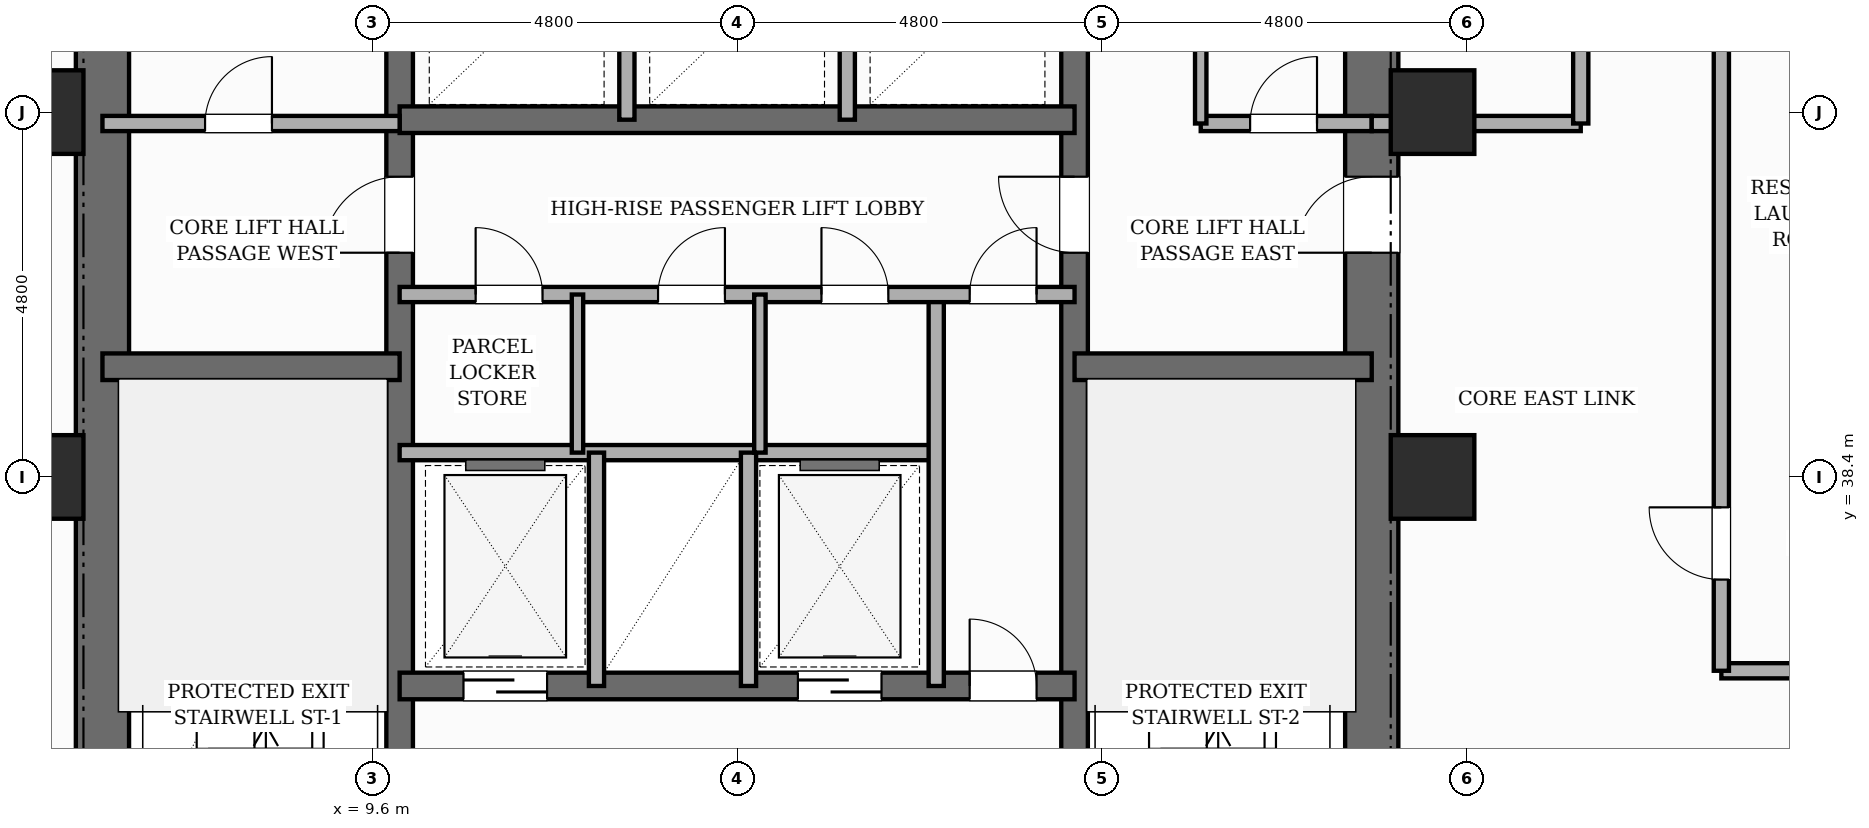
"""IFC4 building model, lengths in metres.
Left out: names, types, materials, properties, quantities, classifications, styles, units other than length and angle.
Written with IfcOpenShell. Run it as: python <this file> out.ifc"""

import sys

from ifc_helpers import new_model, si_unit, direction, frame, frame_2d, origin, origin_2d, place, context, subcontext, project, spatial, rectangle, extrude, element, fill, save


model = new_model("IFC4")
c1 = context("Model", 3, precision=1e-05, world=origin(), true_north=direction((0.0, 1.0)))
c2 = subcontext(c1, "Body", "Model", "MODEL_VIEW")
j1 = project(units=[si_unit("LENGTHUNIT", "METRE"), si_unit("PLANEANGLEUNIT", "RADIAN")], contexts=[c1])
p1 = place(None, origin())
s1 = spatial("IfcSite", under=j1, at=p1, CompositionType="ELEMENT")
p2 = place(p1, origin())
s2 = spatial("IfcBuilding", under=s1, at=p2, CompositionType="ELEMENT")
p3 = place(p2, frame((0.0, 0.0, 79.0)))
s3 = spatial("IfcBuildingStorey", under=s2, at=p3, CompositionType="ELEMENT", Elevation=79.0)
p4 = place(p3, frame((6.05, 30.55, 0.0), z_axis=(0.0, 0.0, 1.0), x_axis=(0.0, 1.0, 0.0)))
e1 = element("IfcWall", 1, at=p4, inside=s3, PredefinedType="SHEAR", context=c2, shape_type="SweptSolid", body=[
    extrude(rectangle(XDim=15.6, YDim=0.7, at=frame_2d((7.8, 0.0))), origin(), (0.0, 0.0, 1.0), 3.6),
])
p5 = place(p3, frame((22.75, 30.55, 0.0), z_axis=(0.0, 0.0, 1.0), x_axis=(0.0, 1.0, 0.0)))
e2 = element("IfcWall", 2, at=p5, inside=s3, PredefinedType="SHEAR", context=c2, shape_type="SweptSolid", body=[
    extrude(rectangle(XDim=15.6, YDim=0.7, at=frame_2d((7.8, 0.0))), origin(), (0.0, 0.0, 1.0), 3.6),
])
p6 = place(p5, frame((10.8, 0.0, 0.0)))
e3 = element("IfcOpeningElement", 3, at=p6, cuts=e2, PredefinedType="OPENING", context=c2, shape_type="SweptSolid", body=[
    extrude(rectangle(XDim=1.0, YDim=2.15, at=frame_2d((0.5, 1.075))), frame((0.0, 0.36, 0.0), z_axis=(0.0, -1.0, 0.0), x_axis=(1.0, 0.0, 0.0)), (0.0, 0.0, 1.0), 0.72),
])
p7 = place(p3, frame((9.96, 30.9, 0.0), z_axis=(0.0, 0.0, 1.0), x_axis=(0.0, 1.0, 0.0)))
e4 = element("IfcWall", 4, at=p7, inside=s3, PredefinedType="SHEAR", context=c2, shape_type="SweptSolid", body=[
    extrude(rectangle(XDim=14.9, YDim=0.35, at=frame_2d((7.45, 0.0))), origin(), (0.0, 0.0, 1.0), 3.6),
])
p8 = place(p7, frame((0.65, 0.0, 0.0)))
e5 = element("IfcOpeningElement", 5, at=p8, cuts=e4, PredefinedType="OPENING", context=c2, shape_type="SweptSolid", body=[
    extrude(rectangle(XDim=0.95, YDim=2.1, at=frame_2d((0.475, 1.05))), frame((0.0, 0.185, 0.0), z_axis=(0.0, -1.0, 0.0), x_axis=(1.0, 0.0, 0.0)), (0.0, 0.0, 1.0), 0.37),
])
p9 = place(p7, frame((10.45, 0.0, 0.0)))
e6 = element("IfcOpeningElement", 6, at=p9, cuts=e4, PredefinedType="OPENING", context=c2, shape_type="SweptSolid", body=[
    extrude(rectangle(XDim=1.0, YDim=2.15, at=frame_2d((0.5, 1.075))), frame((0.0, 0.185, 0.0), z_axis=(0.0, -1.0, 0.0), x_axis=(1.0, 0.0, 0.0)), (0.0, 0.0, 1.0), 0.37),
])
p10 = place(p3, frame((18.84, 30.9, 0.0), z_axis=(0.0, 0.0, 1.0), x_axis=(0.0, 1.0, 0.0)))
e7 = element("IfcWall", 7, at=p10, inside=s3, PredefinedType="SHEAR", context=c2, shape_type="SweptSolid", body=[
    extrude(rectangle(XDim=14.9, YDim=0.35, at=frame_2d((7.45, 0.0))), origin(), (0.0, 0.0, 1.0), 3.6),
])
p11 = place(p10, frame((0.65, 0.0, 0.0)))
e8 = element("IfcOpeningElement", 8, at=p11, cuts=e7, PredefinedType="OPENING", context=c2, shape_type="SweptSolid", body=[
    extrude(rectangle(XDim=0.95, YDim=2.1, at=frame_2d((0.475, 1.05))), frame((0.0, 0.185, 0.0), z_axis=(0.0, -1.0, 0.0), x_axis=(1.0, 0.0, 0.0)), (0.0, 0.0, 1.0), 0.37),
])
p12 = place(p10, frame((10.45, 0.0, 0.0)))
e9 = element("IfcOpeningElement", 9, at=p12, cuts=e7, PredefinedType="OPENING", context=c2, shape_type="SweptSolid", body=[
    extrude(rectangle(XDim=1.0, YDim=2.15, at=frame_2d((0.5, 1.075))), frame((0.0, 0.185, 0.0), z_axis=(0.0, -1.0, 0.0), x_axis=(1.0, 0.0, 0.0)), (0.0, 0.0, 1.0), 0.37),
])
for number, where, z_axis, x_axis in (
    (10, (6.05, 39.85, 0.0), (0.0, 0.0, 1.0), (1.0, 0.0, 0.0)),
    (11, (18.84, 39.85, 0.0), (0.0, 0.0, 1.0), (1.0, 0.0, 0.0)),
):
    element("IfcWall", number, at=place(p3, frame(where, z_axis=z_axis, x_axis=x_axis)), inside=s3, PredefinedType="SHEAR", context=c2, shape_type="SweptSolid", body=[
        extrude(rectangle(XDim=3.91, YDim=0.35, at=frame_2d((1.955, 0.0))), origin(), (0.0, 0.0, 1.0), 3.6),
    ])
p13 = place(p3, frame((9.96, 35.65, 0.0), z_axis=(0.0, 0.0, 1.0), x_axis=(1.0, 0.0, 0.0)))
e12 = element("IfcWall", 12, at=p13, inside=s3, PredefinedType="SHEAR", context=c2, shape_type="SweptSolid", body=[
    extrude(rectangle(XDim=8.88, YDim=0.35, at=frame_2d((4.44, 0.0))), origin(), (0.0, 0.0, 1.0), 3.6),
])
p14 = place(p13, frame((0.84, 0.0, 0.0)))
e13 = element("IfcOpeningElement", 13, at=p14, cuts=e12, PredefinedType="OPENING", context=c2, shape_type="SweptSolid", body=[
    extrude(rectangle(XDim=1.1, YDim=2.15, at=frame_2d((0.55, 1.075))), frame((0.0, 0.185, 0.0), z_axis=(0.0, -1.0, 0.0), x_axis=(1.0, 0.0, 0.0)), (0.0, 0.0, 1.0), 0.37),
])
p15 = place(p13, frame((5.24, 0.0, 0.0)))
e14 = element("IfcOpeningElement", 14, at=p15, cuts=e12, PredefinedType="OPENING", context=c2, shape_type="SweptSolid", body=[
    extrude(rectangle(XDim=1.1, YDim=2.15, at=frame_2d((0.55, 1.075))), frame((0.0, 0.185, 0.0), z_axis=(0.0, -1.0, 0.0), x_axis=(1.0, 0.0, 0.0)), (0.0, 0.0, 1.0), 0.37),
])
p16 = place(p13, frame((7.5, 0.0, 0.0)))
e15 = element("IfcOpeningElement", 15, at=p16, cuts=e12, PredefinedType="OPENING", context=c2, shape_type="SweptSolid", body=[
    extrude(rectangle(XDim=0.88, YDim=2.1, at=frame_2d((0.44, 1.05))), frame((0.0, 0.185, 0.0), z_axis=(0.0, -1.0, 0.0), x_axis=(1.0, 0.0, 0.0)), (0.0, 0.0, 1.0), 0.37),
])
p17 = place(p3, frame((9.96, 43.1, 0.0), z_axis=(0.0, 0.0, 1.0), x_axis=(1.0, 0.0, 0.0)))
e16 = element("IfcWall", 16, at=p17, inside=s3, PredefinedType="SHEAR", context=c2, shape_type="SweptSolid", body=[
    extrude(rectangle(XDim=8.88, YDim=0.35, at=frame_2d((4.44, 0.0))), origin(), (0.0, 0.0, 1.0), 3.6),
])
for number, where, z_axis, x_axis in (
    (17, (5.25, 38.4, 0.0), (0.0, 0.0, 1.0), (1.0, 0.0, 0.0)),
    (18, (5.25, 43.2, 0.0), (0.0, 0.0, 1.0), (1.0, 0.0, 0.0)),
    (19, (23.55, 38.4, 0.0), (0.0, 0.0, 1.0), (1.0, 0.0, 0.0)),
    (20, (23.55, 43.2, 0.0), (0.0, 0.0, 1.0), (1.0, 0.0, 0.0)),
):
    element("IfcColumn", number, at=place(p3, frame(where, z_axis=z_axis, x_axis=x_axis)), inside=s3, PredefinedType="COLUMN", context=c2, shape_type="SweptSolid", body=[
        extrude(rectangle(XDim=1.1, YDim=1.1, at=origin_2d()), origin(), (0.0, 0.0, 1.0), 3.6),
    ])
p18 = place(p3, frame((9.96, 38.72, 0.0), z_axis=(0.0, 0.0, 1.0), x_axis=(1.0, 0.0, 0.0)))
e21 = element("IfcWall", 21, at=p18, inside=s3, PredefinedType="POLYGONAL", context=c2, shape_type="SweptSolid", body=[
    extrude(rectangle(XDim=7.06, YDim=0.2, at=frame_2d((3.53, 0.0))), origin(), (0.0, 0.0, 1.0), 3.35),
])
for number, where, z_axis, x_axis in (
    (22, (12.55, 35.65, 0.0), (0.0, 0.0, 1.0), (0.0, 1.0, 0.0)),
    (23, (14.55, 35.65, 0.0), (0.0, 0.0, 1.0), (0.0, 1.0, 0.0)),
):
    element("IfcWall", number, at=place(p3, frame(where, z_axis=z_axis, x_axis=x_axis)), inside=s3, PredefinedType="POLYGONAL", context=c2, shape_type="SweptSolid", body=[
        extrude(rectangle(XDim=3.07, YDim=0.2, at=frame_2d((1.535, 0.0))), origin(), (0.0, 0.0, 1.0), 3.35),
    ])
p19 = place(p3, frame((17.02, 35.65, 0.0), z_axis=(0.0, 0.0, 1.0), x_axis=(0.0, 1.0, 0.0)))
e24 = element("IfcWall", 24, at=p19, inside=s3, PredefinedType="POLYGONAL", context=c2, shape_type="SweptSolid", body=[
    extrude(rectangle(XDim=5.15, YDim=0.2, at=frame_2d((2.575, 0.0))), origin(), (0.0, 0.0, 1.0), 3.35),
])
p20 = place(p3, frame((9.96, 40.8, 0.0), z_axis=(0.0, 0.0, 1.0), x_axis=(1.0, 0.0, 0.0)))
e25 = element("IfcWall", 25, at=p20, inside=s3, PredefinedType="POLYGONAL", context=c2, shape_type="SweptSolid", body=[
    extrude(rectangle(XDim=8.88, YDim=0.2, at=frame_2d((4.44, 0.0))), origin(), (0.0, 0.0, 1.0), 3.35),
])
p21 = place(p20, frame((7.5, 0.0, 0.0)))
e26 = element("IfcOpeningElement", 26, at=p21, cuts=e25, PredefinedType="OPENING", context=c2, shape_type="SweptSolid", body=[
    extrude(rectangle(XDim=0.88, YDim=2.1, at=frame_2d((0.44, 1.05))), frame((0.0, 0.11, 0.0), z_axis=(0.0, -1.0, 0.0), x_axis=(1.0, 0.0, 0.0)), (0.0, 0.0, 1.0), 0.22),
])
p22 = place(p20, frame((1.0, 0.0, 0.0)))
e27 = element("IfcOpeningElement", 27, at=p22, cuts=e25, PredefinedType="OPENING", context=c2, shape_type="SweptSolid", body=[
    extrude(rectangle(XDim=0.88, YDim=2.1, at=frame_2d((0.44, 1.05))), frame((0.0, 0.11, 0.0), z_axis=(0.0, -1.0, 0.0), x_axis=(1.0, 0.0, 0.0)), (0.0, 0.0, 1.0), 0.22),
])
p23 = place(p20, frame((3.4, 0.0, 0.0)))
e28 = element("IfcOpeningElement", 28, at=p23, cuts=e25, PredefinedType="OPENING", context=c2, shape_type="SweptSolid", body=[
    extrude(rectangle(XDim=0.88, YDim=2.1, at=frame_2d((0.44, 1.05))), frame((0.0, 0.11, 0.0), z_axis=(0.0, -1.0, 0.0), x_axis=(1.0, 0.0, 0.0)), (0.0, 0.0, 1.0), 0.22),
])
p24 = place(p20, frame((5.55, 0.0, 0.0)))
e29 = element("IfcOpeningElement", 29, at=p24, cuts=e25, PredefinedType="OPENING", context=c2, shape_type="SweptSolid", body=[
    extrude(rectangle(XDim=0.88, YDim=2.1, at=frame_2d((0.44, 1.05))), frame((0.0, 0.11, 0.0), z_axis=(0.0, -1.0, 0.0), x_axis=(1.0, 0.0, 0.0)), (0.0, 0.0, 1.0), 0.22),
])
p25 = place(p3, frame((20.5, 43.05, 0.0), z_axis=(0.0, 0.0, 1.0), x_axis=(1.0, 0.0, 0.0)))
e30 = element("IfcWall", 30, at=p25, inside=s3, PredefinedType="POLYGONAL", context=c2, shape_type="SweptSolid", body=[
    extrude(rectangle(XDim=2.25, YDim=0.2, at=frame_2d((1.125, 0.0))), origin(), (0.0, 0.0, 1.0), 2.53),
])
p26 = place(p25, frame((0.65, 0.0, 0.0)))
e31 = element("IfcOpeningElement", 31, at=p26, cuts=e30, PredefinedType="OPENING", context=c2, shape_type="SweptSolid", body=[
    extrude(rectangle(XDim=0.88, YDim=2.1, at=frame_2d((0.44, 1.05))), frame((0.0, 0.11, 0.0), z_axis=(0.0, -1.0, 0.0), x_axis=(1.0, 0.0, 0.0)), (0.0, 0.0, 1.0), 0.22),
])
p27 = place(p3, frame((6.05, 43.05, 0.0), z_axis=(0.0, 0.0, 1.0), x_axis=(1.0, 0.0, 0.0)))
e32 = element("IfcWall", 32, at=p27, inside=s3, PredefinedType="POLYGONAL", context=c2, shape_type="SweptSolid", body=[
    extrude(rectangle(XDim=3.91, YDim=0.2, at=frame_2d((1.955, 0.0))), origin(), (0.0, 0.0, 1.0), 2.53),
])
p28 = place(p27, frame((1.35, 0.0, 0.0)))
e33 = element("IfcOpeningElement", 33, at=p28, cuts=e32, PredefinedType="OPENING", context=c2, shape_type="SweptSolid", body=[
    extrude(rectangle(XDim=0.88, YDim=2.1, at=frame_2d((0.44, 1.05))), frame((0.0, 0.11, 0.0), z_axis=(0.0, -1.0, 0.0), x_axis=(1.0, 0.0, 0.0)), (0.0, 0.0, 1.0), 0.22),
])
for number, where, z_axis, x_axis in (
    (34, (12.95, 43.1, 0.0), (0.0, 0.0, 1.0), (0.0, 1.0, 0.0)),
    (35, (15.85, 43.1, 0.0), (0.0, 0.0, 1.0), (0.0, 1.0, 0.0)),
):
    element("IfcWall", number, at=place(p3, frame(where, z_axis=z_axis, x_axis=x_axis)), inside=s3, PredefinedType="POLYGONAL", context=c2, shape_type="SweptSolid", body=[
        extrude(rectangle(XDim=2.55, YDim=0.2, at=frame_2d((1.275, 0.0))), origin(), (0.0, 0.0, 1.0), 3.35),
    ])
for number, where, z_axis, x_axis in (
    (36, (12.3, 38.72, 0.0), (0.0, 0.0, 1.0), (0.0, 1.0, 0.0)),
    (37, (14.7, 38.72, 0.0), (0.0, 0.0, 1.0), (0.0, 1.0, 0.0)),
):
    element("IfcWall", number, at=place(p3, frame(where, z_axis=z_axis, x_axis=x_axis)), inside=s3, PredefinedType="PARTITIONING", context=c2, shape_type="SweptSolid", body=[
        extrude(rectangle(XDim=2.08, YDim=0.15, at=frame_2d((1.04, 0.0))), origin(), (0.0, 0.0, 1.0), 3.35),
    ])
p29 = place(p3, frame((20.5, 43.05, 0.0), z_axis=(0.0, 0.0, 1.0), x_axis=(0.0, 1.0, 0.0)))
e38 = element("IfcWall", 38, at=p29, inside=s3, PredefinedType="PARTITIONING", context=c2, shape_type="SweptSolid", body=[
    extrude(rectangle(XDim=2.6, YDim=0.15, at=frame_2d((1.3, 0.0))), origin(), (0.0, 0.0, 1.0), 3.35),
])
p30 = place(p3, frame((27.35, 35.85, 0.0), z_axis=(0.0, 0.0, 1.0), x_axis=(1.0, 0.0, 0.0)))
e39 = element("IfcWall", 39, at=p30, inside=s3, PredefinedType="PARTITIONING", context=c2, shape_type="SweptSolid", body=[
    extrude(rectangle(XDim=14.43, YDim=0.2, at=frame_2d((7.215, 0.0))), origin(), (0.0, 0.0, 1.0), 3.35),
])
p31 = place(p30, frame((2.97, 0.0, 0.0)))
e40 = element("IfcOpeningElement", 40, at=p31, cuts=e39, PredefinedType="OPENING", context=c2, shape_type="SweptSolid", body=[
    extrude(rectangle(XDim=0.98, YDim=2.18, at=frame_2d((0.49, 1.09))), frame((0.0, 0.11, 0.0), z_axis=(0.0, -1.0, 0.0), x_axis=(1.0, 0.0, 0.0)), (0.0, 0.0, 1.0), 0.22),
])
p32 = place(p30, frame((10.125, 0.0, 0.0)))
e41 = element("IfcOpeningElement", 41, at=p32, cuts=e39, PredefinedType="OPENING", context=c2, shape_type="SweptSolid", body=[
    extrude(rectangle(XDim=0.98, YDim=2.18, at=frame_2d((0.49, 1.09))), frame((0.0, 0.11, 0.0), z_axis=(0.0, -1.0, 0.0), x_axis=(1.0, 0.0, 0.0)), (0.0, 0.0, 1.0), 0.22),
])
p33 = place(p3, frame((27.35, 35.85, 0.0), z_axis=(0.0, 0.0, 1.0), x_axis=(0.0, 1.0, 0.0)))
e42 = element("IfcWall", 42, at=p33, inside=s3, PredefinedType="PARTITIONING", context=c2, shape_type="SweptSolid", body=[
    extrude(rectangle(XDim=11.83, YDim=0.2, at=frame_2d((5.915, 0.0))), origin(), (0.0, 0.0, 1.0), 3.35),
])
p34 = place(p33, frame((1.2, 0.0, 0.0)))
e43 = element("IfcOpeningElement", 43, at=p34, cuts=e42, PredefinedType="OPENING", context=c2, shape_type="SweptSolid", body=[
    extrude(rectangle(XDim=0.95, YDim=2.15, at=frame_2d((0.475, 1.075))), frame((0.0, 0.11, 0.0), z_axis=(0.0, -1.0, 0.0), x_axis=(1.0, 0.0, 0.0)), (0.0, 0.0, 1.0), 0.22),
])
p35 = place(p3, frame((22.75, 43.05, 0.0), z_axis=(0.0, 0.0, 1.0), x_axis=(1.0, 0.0, 0.0)))
e44 = element("IfcWall", 44, at=p35, inside=s3, PredefinedType="PARTITIONING", context=c2, shape_type="SweptSolid", body=[
    extrude(rectangle(XDim=2.75, YDim=0.2, at=frame_2d((1.375, 0.0))), origin(), (0.0, 0.0, 1.0), 2.53),
])
p36 = place(p3, frame((25.5, 43.05, 0.0), z_axis=(0.0, 0.0, 1.0), x_axis=(0.0, 1.0, 0.0)))
e45 = element("IfcWall", 45, at=p36, inside=s3, PredefinedType="PARTITIONING", context=c2, shape_type="SweptSolid", body=[
    extrude(rectangle(XDim=2.75, YDim=0.2, at=frame_2d((1.375, 0.0))), origin(), (0.0, 0.0, 1.0), 3.35),
])
p37 = place(p14, origin())
e46 = element("IfcDoor", 46, at=p37, inside=s3, OperationType="SLIDING_TO_LEFT", PredefinedType="DOOR", context=c2, shape_type="SweptSolid", body=[
    extrude(rectangle(XDim=1.1, YDim=2.15, at=frame_2d((0.55, 1.075))), frame((0.0, 0.025, 0.0), z_axis=(0.0, -1.0, 0.0), x_axis=(1.0, 0.0, 0.0)), (0.0, 0.0, 1.0), 0.05),
])
fill(e13, e46)
p38 = place(p15, origin())
e47 = element("IfcDoor", 47, at=p38, inside=s3, OperationType="SLIDING_TO_RIGHT", PredefinedType="DOOR", context=c2, shape_type="SweptSolid", body=[
    extrude(rectangle(XDim=1.1, YDim=2.15, at=frame_2d((0.55, 1.075))), frame((0.0, 0.025, 0.0), z_axis=(0.0, -1.0, 0.0), x_axis=(1.0, 0.0, 0.0)), (0.0, 0.0, 1.0), 0.05),
])
fill(e14, e47)
p39 = place(p16, origin())
e48 = element("IfcDoor", 48, at=p39, inside=s3, OperationType="SINGLE_SWING_LEFT", PredefinedType="DOOR", context=c2, shape_type="SweptSolid", body=[
    extrude(rectangle(XDim=0.88, YDim=2.1, at=frame_2d((0.44, 1.05))), frame((0.0, 0.025, 0.0), z_axis=(0.0, -1.0, 0.0), x_axis=(1.0, 0.0, 0.0)), (0.0, 0.0, 1.0), 0.05),
])
fill(e15, e48)
p40 = place(p21, origin())
e49 = element("IfcDoor", 49, at=p40, inside=s3, OperationType="SINGLE_SWING_RIGHT", PredefinedType="DOOR", context=c2, shape_type="SweptSolid", body=[
    extrude(rectangle(XDim=0.88, YDim=2.1, at=frame_2d((0.44, 1.05))), frame((0.0, 0.025, 0.0), z_axis=(0.0, -1.0, 0.0), x_axis=(1.0, 0.0, 0.0)), (0.0, 0.0, 1.0), 0.05),
])
fill(e26, e49)
p41 = place(p9, origin())
e50 = element("IfcDoor", 50, at=p41, inside=s3, OperationType="SINGLE_SWING_LEFT", PredefinedType="DOOR", context=c2, shape_type="SweptSolid", body=[
    extrude(rectangle(XDim=1.0, YDim=2.15, at=frame_2d((0.5, 1.075))), frame((0.0, 0.025, 0.0), z_axis=(0.0, -1.0, 0.0), x_axis=(1.0, 0.0, 0.0)), (0.0, 0.0, 1.0), 0.05),
])
fill(e6, e50)
p42 = place(p12, origin())
e51 = element("IfcDoor", 51, at=p42, inside=s3, OperationType="SINGLE_SWING_RIGHT", PredefinedType="DOOR", context=c2, shape_type="SweptSolid", body=[
    extrude(rectangle(XDim=1.0, YDim=2.15, at=frame_2d((0.5, 1.075))), frame((0.0, 0.025, 0.0), z_axis=(0.0, -1.0, 0.0), x_axis=(1.0, 0.0, 0.0)), (0.0, 0.0, 1.0), 0.05),
])
fill(e9, e51)
p43 = place(p6, origin())
e52 = element("IfcDoor", 52, at=p43, inside=s3, OperationType="SINGLE_SWING_LEFT", PredefinedType="DOOR", context=c2, shape_type="SweptSolid", body=[
    extrude(rectangle(XDim=1.0, YDim=2.15, at=frame_2d((0.5, 1.075))), frame((0.0, 0.025, 0.0), z_axis=(0.0, -1.0, 0.0), x_axis=(1.0, 0.0, 0.0)), (0.0, 0.0, 1.0), 0.05),
])
fill(e3, e52)
p44 = place(p28, origin())
e53 = element("IfcDoor", 53, at=p44, inside=s3, OperationType="SINGLE_SWING_RIGHT", PredefinedType="DOOR", context=c2, shape_type="SweptSolid", body=[
    extrude(rectangle(XDim=0.88, YDim=2.1, at=frame_2d((0.44, 1.05))), frame((0.0, 0.025, 0.0), z_axis=(0.0, -1.0, 0.0), x_axis=(1.0, 0.0, 0.0)), (0.0, 0.0, 1.0), 0.05),
])
fill(e33, e53)
p45 = place(p22, origin())
e54 = element("IfcDoor", 54, at=p45, inside=s3, OperationType="SINGLE_SWING_LEFT", PredefinedType="DOOR", context=c2, shape_type="SweptSolid", body=[
    extrude(rectangle(XDim=0.88, YDim=2.1, at=frame_2d((0.44, 1.05))), frame((0.0, 0.025, 0.0), z_axis=(0.0, -1.0, 0.0), x_axis=(1.0, 0.0, 0.0)), (0.0, 0.0, 1.0), 0.05),
])
fill(e27, e54)
p46 = place(p23, origin())
e55 = element("IfcDoor", 55, at=p46, inside=s3, OperationType="SINGLE_SWING_RIGHT", PredefinedType="DOOR", context=c2, shape_type="SweptSolid", body=[
    extrude(rectangle(XDim=0.88, YDim=2.1, at=frame_2d((0.44, 1.05))), frame((0.0, 0.025, 0.0), z_axis=(0.0, -1.0, 0.0), x_axis=(1.0, 0.0, 0.0)), (0.0, 0.0, 1.0), 0.05),
])
fill(e28, e55)
p47 = place(p24, origin())
e56 = element("IfcDoor", 56, at=p47, inside=s3, OperationType="SINGLE_SWING_LEFT", PredefinedType="DOOR", context=c2, shape_type="SweptSolid", body=[
    extrude(rectangle(XDim=0.88, YDim=2.1, at=frame_2d((0.44, 1.05))), frame((0.0, 0.025, 0.0), z_axis=(0.0, -1.0, 0.0), x_axis=(1.0, 0.0, 0.0)), (0.0, 0.0, 1.0), 0.05),
])
fill(e29, e56)
p48 = place(p26, origin())
e57 = element("IfcDoor", 57, at=p48, inside=s3, OperationType="SINGLE_SWING_RIGHT", PredefinedType="DOOR", context=c2, shape_type="SweptSolid", body=[
    extrude(rectangle(XDim=0.88, YDim=2.1, at=frame_2d((0.44, 1.05))), frame((0.0, 0.025, 0.0), z_axis=(0.0, -1.0, 0.0), x_axis=(1.0, 0.0, 0.0)), (0.0, 0.0, 1.0), 0.05),
])
fill(e31, e57)
p49 = place(p34, origin())
e58 = element("IfcDoor", 58, at=p49, inside=s3, OperationType="SINGLE_SWING_RIGHT", PredefinedType="DOOR", context=c2, shape_type="SweptSolid", body=[
    extrude(rectangle(XDim=0.95, YDim=2.15, at=frame_2d((0.475, 1.075))), frame((0.0, 0.025, 0.0), z_axis=(0.0, -1.0, 0.0), x_axis=(1.0, 0.0, 0.0)), (0.0, 0.0, 1.0), 0.05),
])
fill(e43, e58)
save(model, sys.argv[1])
